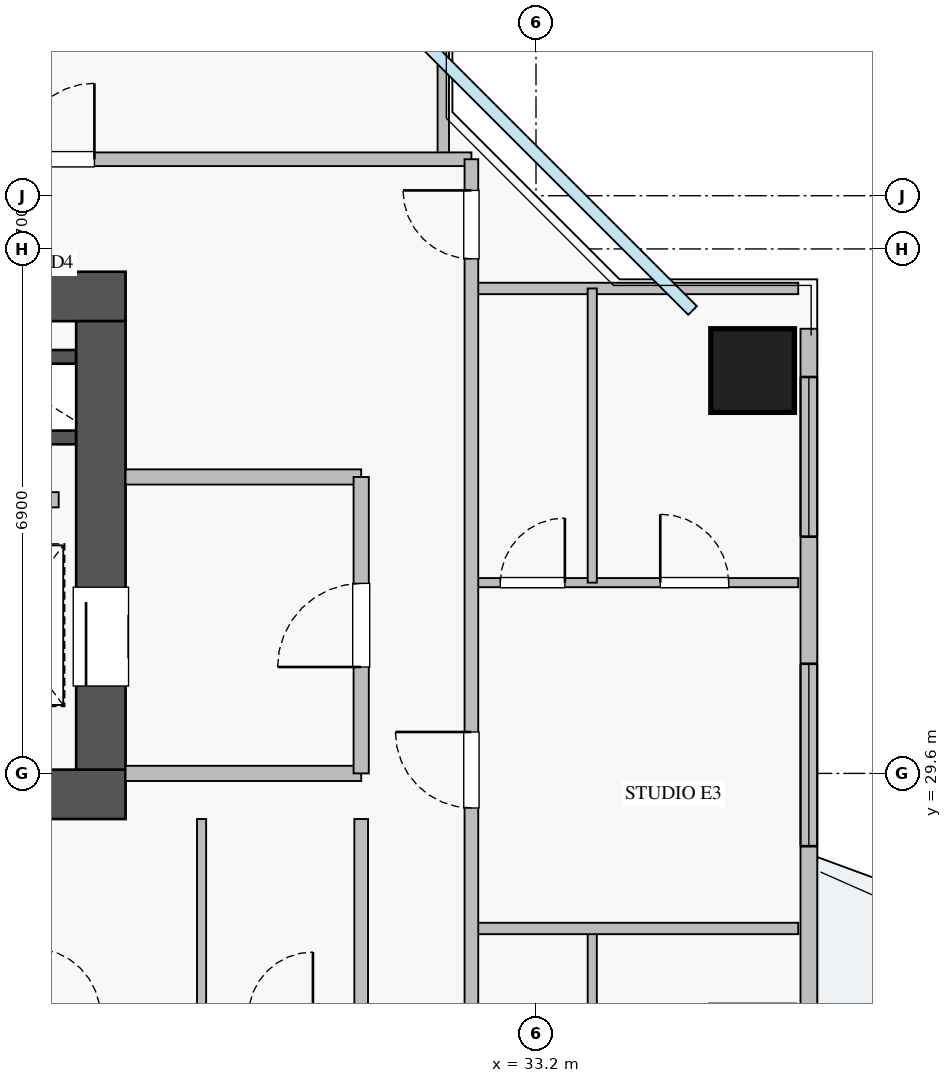
"""IFC4 building model, lengths in metres.
Left out: names, types, materials, properties, quantities, classifications, styles, units other than length and angle.
Written with IfcOpenShell. Run it as: python <this file> out.ifc"""

import sys

from ifc_helpers import new_model, si_unit, direction, frame, frame_2d, origin, origin_2d, place, context, subcontext, project, spatial, rectangle, extrude, source, transform, mapped, element, fill, save


model = new_model("IFC4")
c1 = context("Model", 3, precision=1e-05, world=origin(), true_north=direction((0.0, 1.0)))
c2 = subcontext(c1, "Body", "Model", "MODEL_VIEW")
j1 = project(units=[si_unit("LENGTHUNIT", "METRE"), si_unit("PLANEANGLEUNIT", "RADIAN")], contexts=[c1])
p1 = place(None, origin())
s1 = spatial("IfcSite", under=j1, at=p1, CompositionType="ELEMENT")
p2 = place(p1, origin())
s2 = spatial("IfcBuilding", under=s1, at=p2, CompositionType="ELEMENT")
p3 = place(p2, frame((0.0, 0.0, 129.5)))
s3 = spatial("IfcBuildingStorey", under=s2, at=p3, CompositionType="ELEMENT", Elevation=129.5)
for number, where, z_axis, x_axis in (
    (1, (25.8, 35.08, 0.0), (0.0, 0.0, 1.0), (1.0, 0.0, 0.0)),
    (2, (25.8, 34.02, 0.0), (0.0, 0.0, 1.0), (1.0, 0.0, 0.0)),
):
    element("IfcWall", number, at=place(p3, frame(where, z_axis=z_axis, x_axis=x_axis)), inside=s3, PredefinedType="SHEAR", context=c2, shape_type="SweptSolid", body=[
        extrude(rectangle(XDim=1.35, YDim=0.18, at=frame_2d((0.675, 0.0))), origin(), (0.0, 0.0, 1.0), 3.07),
    ])
p4 = place(p3, frame((10.2, 29.325, 0.0), z_axis=(0.0, 0.0, 1.0), x_axis=(1.0, 0.0, 0.0)))
e3 = element("IfcWall", 3, at=p4, inside=s3, PredefinedType="SHEAR", context=c2, shape_type="SweptSolid", body=[
    extrude(rectangle(XDim=17.6, YDim=0.65, at=frame_2d((8.8, 0.0))), origin(), (0.0, 0.0, 1.0), 3.25),
])
p5 = place(p3, frame((10.2, 35.875, 0.0), z_axis=(0.0, 0.0, 1.0), x_axis=(1.0, 0.0, 0.0)))
e4 = element("IfcWall", 4, at=p5, inside=s3, PredefinedType="SHEAR", context=c2, shape_type="SweptSolid", body=[
    extrude(rectangle(XDim=17.6, YDim=0.65, at=frame_2d((8.8, 0.0))), origin(), (0.0, 0.0, 1.0), 3.25),
])
p6 = place(p5, frame((1.15, 0.0, 0.0)))
e5 = element("IfcOpeningElement", 5, at=p6, cuts=e4, PredefinedType="OPENING", context=c2, shape_type="SweptSolid", body=[
    extrude(rectangle(XDim=1.1, YDim=2.05, at=frame_2d((0.55, 1.025))), frame((0.0, 0.335, 0.0), z_axis=(0.0, -1.0, 0.0), x_axis=(1.0, 0.0, 0.0)), (0.0, 0.0, 1.0), 0.67),
])
p7 = place(p5, frame((8.3, 0.0, 0.0)))
e6 = element("IfcOpeningElement", 6, at=p7, cuts=e4, PredefinedType="OPENING", context=c2, shape_type="SweptSolid", body=[
    extrude(rectangle(XDim=1.1, YDim=2.05, at=frame_2d((0.55, 1.025))), frame((0.0, 0.335, 0.0), z_axis=(0.0, -1.0, 0.0), x_axis=(1.0, 0.0, 0.0)), (0.0, 0.0, 1.0), 0.67),
])
p8 = place(p5, frame((4.9, 0.0, 0.0)))
e7 = element("IfcOpeningElement", 7, at=p8, cuts=e4, PredefinedType="OPENING", context=c2, shape_type="SweptSolid", body=[
    extrude(rectangle(XDim=1.1, YDim=2.05, at=frame_2d((0.55, 1.025))), frame((0.0, 0.335, 0.0), z_axis=(0.0, -1.0, 0.0), x_axis=(1.0, 0.0, 0.0)), (0.0, 0.0, 1.0), 0.67),
])
p9 = place(p5, frame((14.74, 0.0, 0.0)))
e8 = element("IfcOpeningElement", 8, at=p9, cuts=e4, PredefinedType="OPENING", context=c2, shape_type="SweptSolid", body=[
    extrude(rectangle(XDim=1.0, YDim=2.05, at=frame_2d((0.5, 1.025))), frame((0.0, 0.335, 0.0), z_axis=(0.0, -1.0, 0.0), x_axis=(1.0, 0.0, 0.0)), (0.0, 0.0, 1.0), 0.67),
])
p10 = place(p5, frame((10.25, 0.0, 0.0)))
e9 = element("IfcOpeningElement", 9, at=p10, cuts=e4, PredefinedType="OPENING", context=c2, shape_type="SweptSolid", body=[
    extrude(rectangle(XDim=1.0, YDim=2.05, at=frame_2d((0.5, 1.025))), frame((0.0, 0.335, 0.0), z_axis=(0.0, -1.0, 0.0), x_axis=(1.0, 0.0, 0.0)), (0.0, 0.0, 1.0), 0.67),
])
p11 = place(p5, frame((12.7, 0.0, 0.0)))
e10 = element("IfcOpeningElement", 10, at=p11, cuts=e4, PredefinedType="OPENING", context=c2, shape_type="SweptSolid", body=[
    extrude(rectangle(XDim=1.0, YDim=2.05, at=frame_2d((0.5, 1.025))), frame((0.0, 0.335, 0.0), z_axis=(0.0, -1.0, 0.0), x_axis=(1.0, 0.0, 0.0)), (0.0, 0.0, 1.0), 0.67),
])
p12 = place(p3, frame((27.475, 29.65, 0.0), z_axis=(0.0, 0.0, 1.0), x_axis=(0.0, 1.0, 0.0)))
e11 = element("IfcWall", 11, at=p12, inside=s3, PredefinedType="SHEAR", context=c2, shape_type="SweptSolid", body=[
    extrude(rectangle(XDim=5.9, YDim=0.65, at=frame_2d((2.95, 0.0))), origin(), (0.0, 0.0, 1.0), 3.25),
])
p13 = place(p12, frame((1.1, 0.0, 0.0)))
e12 = element("IfcOpeningElement", 12, at=p13, cuts=e11, PredefinedType="OPENING", context=c2, shape_type="SweptSolid", body=[
    extrude(rectangle(XDim=1.3, YDim=2.05, at=frame_2d((0.65, 1.025))), frame((0.0, 0.335, 0.0), z_axis=(0.0, -1.0, 0.0), x_axis=(1.0, 0.0, 0.0)), (0.0, 0.0, 1.0), 0.67),
])
m1 = source(origin(), c2, "Body", "SweptSolid", [
    extrude(rectangle(XDim=1.1, YDim=1.1, at=origin_2d()), origin(), (0.0, 0.0, 1.0), 3.25),
])
p14 = place(p3, frame((36.05, 34.9, 0.0), z_axis=(0.0, 0.0, 1.0), x_axis=(1.0, 0.0, 0.0)))
e13 = element("IfcColumn", 13, at=p14, inside=s3, PredefinedType="COLUMN", context=c2, shape_type="MappedRepresentation", body=[
    mapped(m1, transform((0.0, 0.0, 0.0), x_axis=(1.0, 0.0, 0.0), y_axis=(0.0, 1.0, 0.0), z_axis=(0.0, 0.0, 1.0), scale=1.0)),
])
p15 = place(p3, frame((36.79, 10.55, 0.0), z_axis=(0.0, 0.0, 1.0), x_axis=(0.0, 1.0, 0.0)))
e14 = element("IfcWall", 14, at=p15, inside=s3, PredefinedType="STANDARD", context=c2, shape_type="SweptSolid", body=[
    extrude(rectangle(XDim=24.9, YDim=0.22, at=frame_2d((12.45, 0.0))), origin(), (0.0, 0.0, 1.0), 2.61),
])
p16 = place(p15, frame((13.3, 0.0, 0.0)))
e15 = element("IfcOpeningElement", 15, at=p16, cuts=e14, PredefinedType="OPENING", context=c2, shape_type="SweptSolid", body=[
    extrude(rectangle(XDim=1.2, YDim=2.1, at=frame_2d((0.6, 1.05))), frame((0.0, 0.12, 0.0), z_axis=(0.0, -1.0, 0.0), x_axis=(1.0, 0.0, 0.0)), (0.0, 0.0, 1.0), 0.24),
])
p17 = place(p15, frame((1.912, 0.0, 0.9)))
e16 = element("IfcOpeningElement", 16, at=p17, cuts=e14, PredefinedType="OPENING", context=c2, shape_type="SweptSolid", body=[
    extrude(rectangle(XDim=2.4, YDim=1.48, at=frame_2d((1.2, 0.74))), frame((0.0, 0.12, 0.0), z_axis=(0.0, -1.0, 0.0), x_axis=(1.0, 0.0, 0.0)), (0.0, 0.0, 1.0), 0.24),
])
p18 = place(p15, frame((22.165, 0.0, 0.9)))
e17 = element("IfcOpeningElement", 17, at=p18, cuts=e14, PredefinedType="OPENING", context=c2, shape_type="SweptSolid", body=[
    extrude(rectangle(XDim=2.1, YDim=1.5, at=frame_2d((1.05, 0.75))), frame((0.0, 0.12, 0.0), z_axis=(0.0, -1.0, 0.0), x_axis=(1.0, 0.0, 0.0)), (0.0, 0.0, 1.0), 0.24),
])
p19 = place(p15, frame((18.093, 0.0, 0.9)))
e18 = element("IfcOpeningElement", 18, at=p19, cuts=e14, PredefinedType="OPENING", context=c2, shape_type="SweptSolid", body=[
    extrude(rectangle(XDim=2.4, YDim=1.5, at=frame_2d((1.2, 0.75))), frame((0.0, 0.12, 0.0), z_axis=(0.0, -1.0, 0.0), x_axis=(1.0, 0.0, 0.0)), (0.0, 0.0, 1.0), 0.24),
])
p20 = place(p15, frame((7.875, 0.0, 0.9)))
e19 = element("IfcOpeningElement", 19, at=p20, cuts=e14, PredefinedType="OPENING", context=c2, shape_type="SweptSolid", body=[
    extrude(rectangle(XDim=0.9, YDim=1.2, at=frame_2d((0.45, 0.6))), frame((0.0, 0.12, 0.0), z_axis=(0.0, -1.0, 0.0), x_axis=(1.0, 0.0, 0.0)), (0.0, 0.0, 1.0), 0.24),
])
for number, where, z_axis, x_axis in (
    (20, (27.8, 29.6, 0.0), (0.0, 0.0, 1.0), (1.0, 0.0, 0.0)),
    (21, (27.8, 33.5, 0.0), (0.0, 0.0, 1.0), (1.0, 0.0, 0.0)),
):
    element("IfcWall", number, at=place(p3, frame(where, z_axis=z_axis, x_axis=x_axis)), inside=s3, PredefinedType="PARTITIONING", context=c2, shape_type="SweptSolid", body=[
        extrude(rectangle(XDim=3.1, YDim=0.2, at=frame_2d((1.55, 0.0))), origin(), (0.0, 0.0, 1.0), 3.07),
    ])
p21 = place(p3, frame((30.9, 29.6, 0.0), z_axis=(0.0, 0.0, 1.0), x_axis=(0.0, 1.0, 0.0)))
e22 = element("IfcWall", 22, at=p21, inside=s3, PredefinedType="PARTITIONING", context=c2, shape_type="SweptSolid", body=[
    extrude(rectangle(XDim=3.9, YDim=0.2, at=frame_2d((1.95, 0.0))), origin(), (0.0, 0.0, 1.0), 3.07),
])
p22 = place(p21, frame((1.4, 0.0, 0.0)))
e23 = element("IfcOpeningElement", 23, at=p22, cuts=e22, PredefinedType="OPENING", context=c2, shape_type="SweptSolid", body=[
    extrude(rectangle(XDim=1.1, YDim=2.05, at=frame_2d((0.55, 1.025))), frame((0.0, 0.11, 0.0), z_axis=(0.0, -1.0, 0.0), x_axis=(1.0, 0.0, 0.0)), (0.0, 0.0, 1.0), 0.22),
])
p23 = place(p3, frame((21.75, 33.2, 0.0), z_axis=(0.0, 0.0, 1.0), x_axis=(1.0, 0.0, 0.0)))
e24 = element("IfcWall", 24, at=p23, inside=s3, PredefinedType="PARTITIONING", context=c2, shape_type="SweptSolid", body=[
    extrude(rectangle(XDim=5.17, YDim=0.2, at=frame_2d((2.585, 0.0))), origin(), (0.0, 0.0, 1.0), 3.07),
])
p24 = place(p3, frame((31.98, 37.68, 0.0), z_axis=(0.0, 0.0, 1.0), x_axis=(0.0, 1.0, 0.0)))
e25 = element("IfcWall", 25, at=p24, inside=s3, PredefinedType="PARTITIONING", context=c2, shape_type="SweptSolid", body=[
    extrude(rectangle(XDim=2.97, YDim=0.15, at=frame_2d((1.485, 0.0))), origin(), (0.0, 0.0, 1.0), 3.07),
])
p25 = place(p3, frame((8.72, 37.68, 0.0), z_axis=(0.0, 0.0, 1.0), x_axis=(1.0, 0.0, 0.0)))
e26 = element("IfcWall", 26, at=p25, inside=s3, PredefinedType="PARTITIONING", context=c2, shape_type="SweptSolid", body=[
    extrude(rectangle(XDim=23.63, YDim=0.18, at=frame_2d((11.815, 0.0))), origin(), (0.0, 0.0, 1.0), 3.07),
])
p26 = place(p25, frame((6.04, 0.0, 0.0)))
e27 = element("IfcOpeningElement", 27, at=p26, cuts=e26, PredefinedType="OPENING", context=c2, shape_type="SweptSolid", body=[
    extrude(rectangle(XDim=1.0, YDim=2.05, at=frame_2d((0.5, 1.025))), frame((0.0, 0.1, 0.0), z_axis=(0.0, -1.0, 0.0), x_axis=(1.0, 0.0, 0.0)), (0.0, 0.0, 1.0), 0.2),
])
p27 = place(p25, frame((17.67, 0.0, 0.0)))
e28 = element("IfcOpeningElement", 28, at=p27, cuts=e26, PredefinedType="OPENING", context=c2, shape_type="SweptSolid", body=[
    extrude(rectangle(XDim=1.0, YDim=2.05, at=frame_2d((0.5, 1.025))), frame((0.0, 0.1, 0.0), z_axis=(0.0, -1.0, 0.0), x_axis=(1.0, 0.0, 0.0)), (0.0, 0.0, 1.0), 0.2),
])
p28 = place(p3, frame((32.35, 35.98, 0.0), z_axis=(0.0, 0.0, 1.0), x_axis=(1.0, 0.0, 0.0)))
e29 = element("IfcWall", 29, at=p28, inside=s3, PredefinedType="PARTITIONING", context=c2, shape_type="SweptSolid", body=[
    extrude(rectangle(XDim=4.3, YDim=0.15, at=frame_2d((2.15, 0.0))), origin(), (0.0, 0.0, 1.0), 3.07),
])
p29 = place(p3, frame((33.94, 23.1, 0.0), z_axis=(0.0, 0.0, 1.0), x_axis=(0.0, 1.0, 0.0)))
e30 = element("IfcWall", 30, at=p29, inside=s3, PredefinedType="PLUMBINGWALL", context=c2, shape_type="SweptSolid", body=[
    extrude(rectangle(XDim=4.46, YDim=0.12, at=frame_2d((2.23, 0.0))), origin(), (0.0, 0.0, 1.0), 3.07),
])
p30 = place(p3, frame((32.35, 32.11, 0.0), z_axis=(0.0, 0.0, 1.0), x_axis=(1.0, 0.0, 0.0)))
e31 = element("IfcWall", 31, at=p30, inside=s3, PredefinedType="PLUMBINGWALL", context=c2, shape_type="SweptSolid", body=[
    extrude(rectangle(XDim=4.3, YDim=0.12, at=frame_2d((2.15, 0.0))), origin(), (0.0, 0.0, 1.0), 3.07),
])
p31 = place(p30, frame((0.38, 0.0, 0.0)))
e32 = element("IfcOpeningElement", 32, at=p31, cuts=e31, PredefinedType="OPENING", context=c2, shape_type="SweptSolid", body=[
    extrude(rectangle(XDim=0.85, YDim=2.05, at=frame_2d((0.425, 1.025))), frame((0.0, 0.07, 0.0), z_axis=(0.0, -1.0, 0.0), x_axis=(1.0, 0.0, 0.0)), (0.0, 0.0, 1.0), 0.14),
])
p32 = place(p30, frame((2.485, 0.0, 0.0)))
e33 = element("IfcOpeningElement", 33, at=p32, cuts=e31, PredefinedType="OPENING", context=c2, shape_type="SweptSolid", body=[
    extrude(rectangle(XDim=0.9, YDim=2.05, at=frame_2d((0.45, 1.025))), frame((0.0, 0.07, 0.0), z_axis=(0.0, -1.0, 0.0), x_axis=(1.0, 0.0, 0.0)), (0.0, 0.0, 1.0), 0.14),
])
p33 = place(p3, frame((33.94, 32.11, 0.0), z_axis=(0.0, 0.0, 1.0), x_axis=(0.0, 1.0, 0.0)))
e34 = element("IfcWall", 34, at=p33, inside=s3, PredefinedType="PLUMBINGWALL", context=c2, shape_type="SweptSolid", body=[
    extrude(rectangle(XDim=3.87, YDim=0.12, at=frame_2d((1.935, 0.0))), origin(), (0.0, 0.0, 1.0), 3.07),
])
p34 = place(p3, frame((32.35, 27.56, 0.0), z_axis=(0.0, 0.0, 1.0), x_axis=(1.0, 0.0, 0.0)))
e35 = element("IfcWall", 35, at=p34, inside=s3, PredefinedType="PARTITIONING", context=c2, shape_type="SweptSolid", body=[
    extrude(rectangle(XDim=4.3, YDim=0.15, at=frame_2d((2.15, 0.0))), origin(), (0.0, 0.0, 1.0), 3.07),
])
p35 = place(p3, frame((32.35, 8.31, 0.0), z_axis=(0.0, 0.0, 1.0), x_axis=(0.0, 1.0, 0.0)))
e36 = element("IfcWall", 36, at=p35, inside=s3, PredefinedType="PARTITIONING", context=c2, shape_type="SweptSolid", body=[
    extrude(rectangle(XDim=29.37, YDim=0.18, at=frame_2d((14.685, 0.0))), origin(), (0.0, 0.0, 1.0), 3.07),
])
p36 = place(p35, frame((28.06, 0.0, 0.0)))
e37 = element("IfcOpeningElement", 37, at=p36, cuts=e36, PredefinedType="OPENING", context=c2, shape_type="SweptSolid", body=[
    extrude(rectangle(XDim=0.9, YDim=2.05, at=frame_2d((0.45, 1.025))), frame((0.0, 0.1, 0.0), z_axis=(0.0, -1.0, 0.0), x_axis=(1.0, 0.0, 0.0)), (0.0, 0.0, 1.0), 0.2),
])
p37 = place(p35, frame((0.415, 0.0, 0.0)))
e38 = element("IfcOpeningElement", 38, at=p37, cuts=e36, PredefinedType="OPENING", context=c2, shape_type="SweptSolid", body=[
    extrude(rectangle(XDim=0.9, YDim=2.05, at=frame_2d((0.45, 1.025))), frame((0.0, 0.1, 0.0), z_axis=(0.0, -1.0, 0.0), x_axis=(1.0, 0.0, 0.0)), (0.0, 0.0, 1.0), 0.2),
])
p38 = place(p35, frame((5.295, 0.0, 0.0)))
e39 = element("IfcOpeningElement", 39, at=p38, cuts=e36, PredefinedType="OPENING", context=c2, shape_type="SweptSolid", body=[
    extrude(rectangle(XDim=1.0, YDim=2.05, at=frame_2d((0.5, 1.025))), frame((0.0, 0.1, 0.0), z_axis=(0.0, -1.0, 0.0), x_axis=(1.0, 0.0, 0.0)), (0.0, 0.0, 1.0), 0.2),
])
p39 = place(p35, frame((11.645, 0.0, 0.0)))
e40 = element("IfcOpeningElement", 40, at=p39, cuts=e36, PredefinedType="OPENING", context=c2, shape_type="SweptSolid", body=[
    extrude(rectangle(XDim=1.0, YDim=2.05, at=frame_2d((0.5, 1.025))), frame((0.0, 0.1, 0.0), z_axis=(0.0, -1.0, 0.0), x_axis=(1.0, 0.0, 0.0)), (0.0, 0.0, 1.0), 0.2),
])
p40 = place(p35, frame((20.835, 0.0, 0.0)))
e41 = element("IfcOpeningElement", 41, at=p40, cuts=e36, PredefinedType="OPENING", context=c2, shape_type="SweptSolid", body=[
    extrude(rectangle(XDim=1.0, YDim=2.05, at=frame_2d((0.5, 1.025))), frame((0.0, 0.1, 0.0), z_axis=(0.0, -1.0, 0.0), x_axis=(1.0, 0.0, 0.0)), (0.0, 0.0, 1.0), 0.2),
])
p41 = place(p3, frame((28.8, 26.4, 0.0), z_axis=(0.0, 0.0, 1.0), x_axis=(0.0, 1.0, 0.0)))
e42 = element("IfcWall", 42, at=p41, inside=s3, PredefinedType="PLUMBINGWALL", context=c2, shape_type="SweptSolid", body=[
    extrude(rectangle(XDim=2.6, YDim=0.12, at=frame_2d((1.3, 0.0))), origin(), (0.0, 0.0, 1.0), 3.07),
])
p42 = place(p3, frame((30.9, 17.0, 0.0), z_axis=(0.0, 0.0, 1.0), x_axis=(0.0, 1.0, 0.0)))
e43 = element("IfcWall", 43, at=p42, inside=s3, PredefinedType="PARTITIONING", context=c2, shape_type="SweptSolid", body=[
    extrude(rectangle(XDim=12.0, YDim=0.18, at=frame_2d((6.0, 0.0))), origin(), (0.0, 0.0, 1.0), 3.07),
])
p43 = place(p42, frame((1.025, 0.0, 0.0)))
e44 = element("IfcOpeningElement", 44, at=p43, cuts=e43, PredefinedType="OPENING", context=c2, shape_type="SweptSolid", body=[
    extrude(rectangle(XDim=1.0, YDim=2.05, at=frame_2d((0.5, 1.025))), frame((0.0, 0.1, 0.0), z_axis=(0.0, -1.0, 0.0), x_axis=(1.0, 0.0, 0.0)), (0.0, 0.0, 1.0), 0.2),
])
p44 = place(p42, frame((7.185, 0.0, 0.0)))
e45 = element("IfcOpeningElement", 45, at=p44, cuts=e43, PredefinedType="OPENING", context=c2, shape_type="SweptSolid", body=[
    extrude(rectangle(XDim=1.0, YDim=2.05, at=frame_2d((0.5, 1.025))), frame((0.0, 0.1, 0.0), z_axis=(0.0, -1.0, 0.0), x_axis=(1.0, 0.0, 0.0)), (0.0, 0.0, 1.0), 0.2),
])
m2 = source(origin(), c2, "Body", "SweptSolid", [
    extrude(rectangle(XDim=2.1, YDim=1.5, at=frame_2d((1.05, 0.75))), frame((0.0, 0.03, 0.0), z_axis=(0.0, -1.0, 0.0), x_axis=(1.0, 0.0, 0.0)), (0.0, 0.0, 1.0), 0.06),
])
p45 = place(p18, origin())
e46 = element("IfcWindow", 46, at=p45, inside=s3, PartitioningType="TRIPLE_PANEL_VERTICAL", PredefinedType="WINDOW", context=c2, shape_type="MappedRepresentation", body=[
    mapped(m2, transform((0.0, 0.0, 0.0), x_axis=(1.0, 0.0, 0.0), y_axis=(0.0, 1.0, 0.0), z_axis=(0.0, 0.0, 1.0), scale=1.0)),
])
fill(e17, e46)
m3 = source(origin(), c2, "Body", "SweptSolid", [
    extrude(rectangle(XDim=1.3, YDim=2.05, at=frame_2d((0.65, 1.025))), frame((0.0, 0.025, 0.0), z_axis=(0.0, -1.0, 0.0), x_axis=(1.0, 0.0, 0.0)), (0.0, 0.0, 1.0), 0.05),
])
p46 = place(p13, origin())
e47 = element("IfcDoor", 47, at=p46, inside=s3, OperationType="SLIDING_TO_LEFT", PredefinedType="DOOR", context=c2, shape_type="MappedRepresentation", body=[
    mapped(m3, transform((0.0, 0.0, 0.0), x_axis=(1.0, 0.0, 0.0), y_axis=(0.0, 1.0, 0.0), z_axis=(0.0, 0.0, 1.0), scale=1.0)),
])
fill(e12, e47)
m4 = source(origin(), c2, "Body", "SweptSolid", [
    extrude(rectangle(XDim=1.1, YDim=2.05, at=frame_2d((0.55, 1.025))), frame((0.0, 0.025, 0.0), z_axis=(0.0, -1.0, 0.0), x_axis=(1.0, 0.0, 0.0)), (0.0, 0.0, 1.0), 0.05),
])
p47 = place(p22, origin())
e48 = element("IfcDoor", 48, at=p47, inside=s3, OperationType="SINGLE_SWING_LEFT", PredefinedType="DOOR", context=c2, shape_type="MappedRepresentation", body=[
    mapped(m4, transform((0.0, 0.0, 0.0), x_axis=(1.0, 0.0, 0.0), y_axis=(0.0, 1.0, 0.0), z_axis=(0.0, 0.0, 1.0), scale=1.0)),
])
fill(e23, e48)
m5 = source(origin(), c2, "Body", "SweptSolid", [
    extrude(rectangle(XDim=1.0, YDim=2.05, at=frame_2d((0.5, 1.025))), frame((0.0, 0.025, 0.0), z_axis=(0.0, -1.0, 0.0), x_axis=(1.0, 0.0, 0.0)), (0.0, 0.0, 1.0), 0.05),
])
p48 = place(p27, origin())
e49 = element("IfcDoor", 49, at=p48, inside=s3, OperationType="SINGLE_SWING_RIGHT", PredefinedType="DOOR", context=c2, shape_type="MappedRepresentation", body=[
    mapped(m5, transform((0.0, 0.0, 0.0), x_axis=(1.0, 0.0, 0.0), y_axis=(0.0, 1.0, 0.0), z_axis=(0.0, 0.0, 1.0), scale=1.0)),
])
fill(e28, e49)
m6 = source(origin(), c2, "Body", "SweptSolid", [
    extrude(rectangle(XDim=0.85, YDim=2.05, at=frame_2d((0.425, 1.025))), frame((0.0, 0.025, 0.0), z_axis=(0.0, -1.0, 0.0), x_axis=(1.0, 0.0, 0.0)), (0.0, 0.0, 1.0), 0.05),
])
p49 = place(p31, origin())
e50 = element("IfcDoor", 50, at=p49, inside=s3, OperationType="SINGLE_SWING_RIGHT", PredefinedType="DOOR", context=c2, shape_type="MappedRepresentation", body=[
    mapped(m6, transform((0.0, 0.0, 0.0), x_axis=(1.0, 0.0, 0.0), y_axis=(0.0, 1.0, 0.0), z_axis=(0.0, 0.0, 1.0), scale=1.0)),
])
fill(e32, e50)
m7 = source(origin(), c2, "Body", "SweptSolid", [
    extrude(rectangle(XDim=0.9, YDim=2.05, at=frame_2d((0.45, 1.025))), frame((0.0, 0.025, 0.0), z_axis=(0.0, -1.0, 0.0), x_axis=(1.0, 0.0, 0.0)), (0.0, 0.0, 1.0), 0.05),
])
p50 = place(p32, origin())
e51 = element("IfcDoor", 51, at=p50, inside=s3, OperationType="SINGLE_SWING_LEFT", PredefinedType="DOOR", context=c2, shape_type="MappedRepresentation", body=[
    mapped(m7, transform((0.0, 0.0, 0.0), x_axis=(1.0, 0.0, 0.0), y_axis=(0.0, 1.0, 0.0), z_axis=(0.0, 0.0, 1.0), scale=1.0)),
])
fill(e33, e51)
p51 = place(p36, origin())
e52 = element("IfcDoor", 52, at=p51, inside=s3, OperationType="SINGLE_SWING_RIGHT", PredefinedType="DOOR", context=c2, shape_type="MappedRepresentation", body=[
    mapped(m7, transform((0.0, 0.0, 0.0), x_axis=(1.0, 0.0, 0.0), y_axis=(0.0, 1.0, 0.0), z_axis=(0.0, 0.0, 1.0), scale=1.0)),
])
fill(e37, e52)
p52 = place(p40, origin())
e53 = element("IfcDoor", 53, at=p52, inside=s3, OperationType="SINGLE_SWING_RIGHT", PredefinedType="DOOR", context=c2, shape_type="MappedRepresentation", body=[
    mapped(m5, transform((0.0, 0.0, 0.0), x_axis=(1.0, 0.0, 0.0), y_axis=(0.0, 1.0, 0.0), z_axis=(0.0, 0.0, 1.0), scale=1.0)),
])
fill(e41, e53)
m8 = source(origin(), c2, "Body", "SweptSolid", [
    extrude(rectangle(XDim=2.4, YDim=1.5, at=frame_2d((1.2, 0.75))), frame((0.0, 0.03, 0.0), z_axis=(0.0, -1.0, 0.0), x_axis=(1.0, 0.0, 0.0)), (0.0, 0.0, 1.0), 0.06),
])
p53 = place(p19, origin())
e54 = element("IfcWindow", 54, at=p53, inside=s3, PartitioningType="TRIPLE_PANEL_VERTICAL", PredefinedType="WINDOW", context=c2, shape_type="MappedRepresentation", body=[
    mapped(m8, transform((0.0, 0.0, 0.0), x_axis=(1.0, 0.0, 0.0), y_axis=(0.0, 1.0, 0.0), z_axis=(0.0, 0.0, 1.0), scale=1.0)),
])
fill(e18, e54)
save(model, sys.argv[1])
